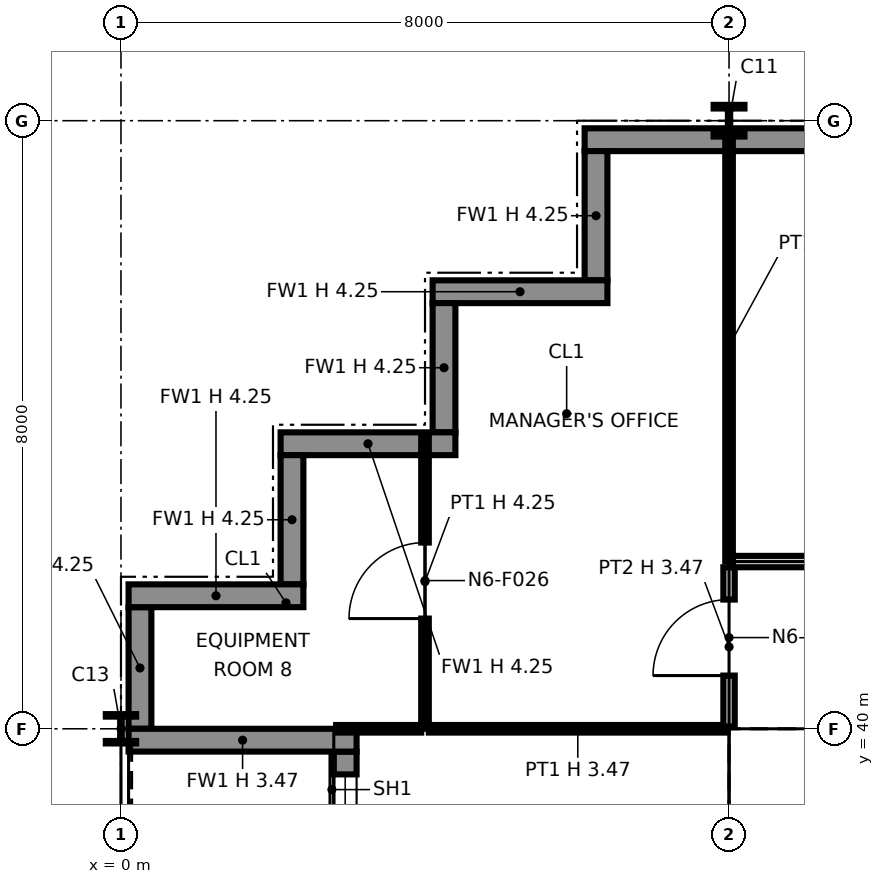
"""IFC4 building model, lengths in metres.
Left out: names, types, materials, properties, quantities, classifications, styles, units other than length and angle.
Written with IfcOpenShell. Run it as: python <this file> out.ifc"""

import sys

from ifc_helpers import new_model, si_unit, direction, frame, frame_2d, origin, origin_2d, place, context, subcontext, project, spatial, polyline, rectangle, i_section, outline, extrude, element, fill, save


model = new_model("IFC4")
c1 = context("Model", 3, precision=1e-05, world=origin(), true_north=direction((0.0, 1.0)))
c2 = subcontext(c1, "Body", "Model", "MODEL_VIEW")
j1 = project(units=[si_unit("LENGTHUNIT", "METRE"), si_unit("PLANEANGLEUNIT", "RADIAN")], contexts=[c1])
p1 = place(None, origin())
s1 = spatial("IfcSite", under=j1, at=p1, CompositionType="ELEMENT")
p2 = place(p1, origin())
s2 = spatial("IfcBuilding", under=s1, at=p2, CompositionType="ELEMENT")
p3 = place(p2, frame((0.0, 0.0, 96.4)))
s3 = spatial("IfcBuildingStorey", under=s2, at=p3, CompositionType="ELEMENT", Elevation=96.4)
p4 = place(p3, frame((0.0, 40.0, 0.0), z_axis=(0.0, 0.0, 1.0), x_axis=(1.0, 0.0, 0.0)))
e1 = element("IfcColumn", 1, at=p4, inside=s3, PredefinedType="COLUMN", context=c2, shape_type="SweptSolid", body=[
    extrude(i_section(OverallWidth=0.399, OverallDepth=0.386, WebThickness=0.021, FlangeThickness=0.033, at=origin_2d()), origin(), (0.0, 0.0, 1.0), 4.25),
])
p5 = place(p3, frame((8.0, 40.0, 0.0), z_axis=(0.0, 0.0, 1.0), x_axis=(1.0, 0.0, 0.0)))
e2 = element("IfcColumn", 2, at=p5, inside=s3, PredefinedType="COLUMN", context=c2, shape_type="SweptSolid", body=[
    extrude(i_section(OverallWidth=0.373, OverallDepth=0.368, WebThickness=0.015, FlangeThickness=0.024, at=origin_2d()), origin(), (0.0, 0.0, 1.0), 4.25),
])
p6 = place(p3, frame((8.0, 48.0, 0.0), z_axis=(0.0, 0.0, 1.0), x_axis=(1.0, 0.0, 0.0)))
e3 = element("IfcColumn", 3, at=p6, inside=s3, PredefinedType="COLUMN", context=c2, shape_type="SweptSolid", body=[
    extrude(i_section(OverallWidth=0.406, OverallDepth=0.417, WebThickness=0.03, FlangeThickness=0.048, at=origin_2d()), origin(), (0.0, 0.0, 1.0), 4.25),
])
p7 = place(p3, frame((0.25, 41.6, 0.0), z_axis=(0.0, 0.0, 1.0), x_axis=(0.0, -1.0, 0.0)))
e4 = element("IfcWall", 4, at=p7, inside=s3, PredefinedType="SOLIDWALL", context=c2, shape_type="SweptSolid", body=[
    extrude(rectangle(XDim=1.6, YDim=0.3, at=frame_2d((0.8, 0.0))), origin(), (0.0, 0.0, 1.0), 4.25),
])
p8 = place(p3, frame((2.95, 39.7, 0.0), z_axis=(0.0, 0.0, 1.0), x_axis=(0.0, -1.0, 0.0)))
e5 = element("IfcWall", 5, at=p8, inside=s3, PredefinedType="SOLIDWALL", context=c2, shape_type="SweptSolid", body=[
    extrude(rectangle(XDim=7.4, YDim=0.3, at=frame_2d((3.7, 0.0))), origin(), (0.0, 0.0, 1.0), 4.25),
])
p9 = place(p8, frame((0.3, 0.0, 0.9)))
e6 = element("IfcOpeningElement", 6, at=p9, cuts=e5, PredefinedType="OPENING", context=c2, shape_type="SweptSolid", body=[
    extrude(rectangle(XDim=2.8, YDim=2.2, at=frame_2d((1.4, 1.1))), frame((0.0, 0.16, 0.0), z_axis=(0.0, -1.0, 0.0), x_axis=(1.0, 0.0, 0.0)), (0.0, 0.0, 1.0), 0.32),
])
p10 = place(p8, frame((4.7, 0.0, 0.0)))
e7 = element("IfcOpeningElement", 7, at=p10, cuts=e5, PredefinedType="OPENING", context=c2, shape_type="SweptSolid", body=[
    extrude(rectangle(XDim=2.0, YDim=2.4, at=frame_2d((1.0, 1.2))), frame((0.0, 0.16, 0.0), z_axis=(0.0, -1.0, 0.0), x_axis=(1.0, 0.0, 0.0)), (0.0, 0.0, 1.0), 0.32),
])
p11 = place(p3, frame((0.1, 39.85, 0.0), z_axis=(0.0, 0.0, 1.0), x_axis=(1.0, 0.0, 0.0)))
e8 = element("IfcWall", 8, at=p11, inside=s3, PredefinedType="SOLIDWALL", context=c2, shape_type="SweptSolid", body=[
    extrude(rectangle(XDim=3.0, YDim=0.3, at=frame_2d((1.5, 0.0))), origin(), (0.0, 0.0, 1.0), 3.469),
])
p12 = place(p3, frame((16.0, 47.75, 0.0), z_axis=(0.0, 0.0, 1.0), x_axis=(-1.0, 0.0, 0.0)))
e9 = element("IfcWall", 9, at=p12, inside=s3, PredefinedType="SOLIDWALL", context=c2, shape_type="SweptSolid", body=[
    extrude(rectangle(XDim=9.9, YDim=0.3, at=frame_2d((4.95, 0.0))), origin(), (0.0, 0.0, 1.0), 4.25),
])
p13 = place(p3, frame((6.25, 47.6, 0.0), z_axis=(0.0, 0.0, 1.0), x_axis=(0.0, -1.0, 0.0)))
e10 = element("IfcWall", 10, at=p13, inside=s3, PredefinedType="SOLIDWALL", context=c2, shape_type="SweptSolid", body=[
    extrude(rectangle(XDim=1.7, YDim=0.3, at=frame_2d((0.85, 0.0))), origin(), (0.0, 0.0, 1.0), 4.25),
])
p14 = place(p3, frame((6.4, 45.75, 0.0), z_axis=(0.0, 0.0, 1.0), x_axis=(-1.0, 0.0, 0.0)))
e11 = element("IfcWall", 11, at=p14, inside=s3, PredefinedType="SOLIDWALL", context=c2, shape_type="SweptSolid", body=[
    extrude(rectangle(XDim=2.3, YDim=0.3, at=frame_2d((1.15, 0.0))), origin(), (0.0, 0.0, 1.0), 4.25),
])
p15 = place(p3, frame((4.25, 45.6, 0.0), z_axis=(0.0, 0.0, 1.0), x_axis=(0.0, -1.0, 0.0)))
e12 = element("IfcWall", 12, at=p15, inside=s3, PredefinedType="SOLIDWALL", context=c2, shape_type="SweptSolid", body=[
    extrude(rectangle(XDim=1.7, YDim=0.3, at=frame_2d((0.85, 0.0))), origin(), (0.0, 0.0, 1.0), 4.25),
])
p16 = place(p3, frame((4.4, 43.75, 0.0), z_axis=(0.0, 0.0, 1.0), x_axis=(-1.0, 0.0, 0.0)))
e13 = element("IfcWall", 13, at=p16, inside=s3, PredefinedType="SOLIDWALL", context=c2, shape_type="SweptSolid", body=[
    extrude(rectangle(XDim=2.3, YDim=0.3, at=frame_2d((1.15, 0.0))), origin(), (0.0, 0.0, 1.0), 4.25),
])
p17 = place(p3, frame((2.25, 43.6, 0.0), z_axis=(0.0, 0.0, 1.0), x_axis=(0.0, -1.0, 0.0)))
e14 = element("IfcWall", 14, at=p17, inside=s3, PredefinedType="SOLIDWALL", context=c2, shape_type="SweptSolid", body=[
    extrude(rectangle(XDim=1.7, YDim=0.3, at=frame_2d((0.85, 0.0))), origin(), (0.0, 0.0, 1.0), 4.25),
])
p18 = place(p3, frame((2.4, 41.75, 0.0), z_axis=(0.0, 0.0, 1.0), x_axis=(-1.0, 0.0, 0.0)))
e15 = element("IfcWall", 15, at=p18, inside=s3, PredefinedType="SOLIDWALL", context=c2, shape_type="SweptSolid", body=[
    extrude(rectangle(XDim=2.3, YDim=0.3, at=frame_2d((1.15, 0.0))), origin(), (0.0, 0.0, 1.0), 4.25),
])
p19 = place(p3, frame((8.75, 32.85, 0.0), z_axis=(0.0, 0.0, 1.0), x_axis=(0.0, 1.0, 0.0)))
e16 = element("IfcWall", 16, at=p19, inside=s3, PredefinedType="PARTITIONING", context=c2, shape_type="SweptSolid", body=[
    extrude(outline(polyline([(0.0, 0.0), (6.3, 0.0), (6.3, 4.25), (3.231, 4.25), (3.23, 3.789), (3.07, 3.789), (3.069, 4.25), (0.0, 4.25), (0.0, 0.0)])), frame((0.0, 0.1, 0.0), z_axis=(0.0, -1.0, 0.0), x_axis=(1.0, 0.0, 0.0)), (0.0, 0.0, 1.0), 0.2),
])
p20 = place(p3, frame((8.65, 39.25, 0.0), z_axis=(0.0, 0.0, 1.0), x_axis=(1.0, 0.0, 0.0)))
e17 = element("IfcWall", 17, at=p20, inside=s3, PredefinedType="PARTITIONING", context=c2, shape_type="SweptSolid", body=[
    extrude(outline(polyline([(0.0, 0.0), (14.7, 0.0), (14.7, 4.25), (7.469, 4.25), (7.469, 3.632), (7.231, 3.632), (7.23, 4.25), (0.0, 4.25), (0.0, 0.0)])), frame((0.0, 0.1, 0.0), z_axis=(0.0, -1.0, 0.0), x_axis=(1.0, 0.0, 0.0)), (0.0, 0.0, 1.0), 0.2),
])
p21 = place(p3, frame((2.83, 40.0, 0.0), z_axis=(0.0, 0.0, 1.0), x_axis=(1.0, 0.0, 0.0)))
e18 = element("IfcWall", 18, at=p21, inside=s3, PredefinedType="PARTITIONING", context=c2, shape_type="SweptSolid", body=[
    extrude(rectangle(XDim=1.12, YDim=0.1, at=frame_2d((0.56, 0.0))), origin(), (0.0, 0.0, 1.0), 3.47),
])
p22 = place(p3, frame((4.05, 40.0, 0.0), z_axis=(0.0, 0.0, 1.0), x_axis=(1.0, 0.0, 0.0)))
e19 = element("IfcWall", 19, at=p22, inside=s3, PredefinedType="PARTITIONING", context=c2, shape_type="SweptSolid", body=[
    extrude(rectangle(XDim=3.92, YDim=0.1, at=frame_2d((1.96, 0.0))), origin(), (0.0, 0.0, 1.0), 3.47),
])
p23 = place(p3, frame((4.0, 40.0, 0.0), z_axis=(0.0, 0.0, 1.0), x_axis=(0.0, 1.0, 0.0)))
e20 = element("IfcWall", 20, at=p23, inside=s3, PredefinedType="PARTITIONING", context=c2, shape_type="SweptSolid", body=[
    extrude(rectangle(XDim=3.87, YDim=0.1, at=frame_2d((1.935, 0.0))), origin(), (0.0, 0.0, 1.0), 4.25),
])
p24 = place(p23, frame((1.45, 0.0, 0.0)))
e21 = element("IfcOpeningElement", 21, at=p24, cuts=e20, PredefinedType="OPENING", context=c2, shape_type="SweptSolid", body=[
    extrude(rectangle(XDim=1.0, YDim=2.1, at=frame_2d((0.5, 1.05))), frame((0.0, 0.06, 0.0), z_axis=(0.0, -1.0, 0.0), x_axis=(1.0, 0.0, 0.0)), (0.0, 0.0, 1.0), 0.12),
])
p25 = place(p3, frame((8.0, 40.03, 0.0), z_axis=(0.0, 0.0, 1.0), x_axis=(0.0, 1.0, 0.0)))
e22 = element("IfcWall", 22, at=p25, inside=s3, PredefinedType="PARTITIONING", context=c2, shape_type="SweptSolid", body=[
    extrude(rectangle(XDim=2.095, YDim=0.15, at=frame_2d((1.047, 0.0))), origin(), (0.0, 0.0, 1.0), 3.47),
])
p26 = place(p25, frame((0.67, 0.0, 0.0)))
e23 = element("IfcOpeningElement", 23, at=p26, cuts=e22, PredefinedType="OPENING", context=c2, shape_type="SweptSolid", body=[
    extrude(rectangle(XDim=1.0, YDim=2.1, at=frame_2d((0.5, 1.05))), frame((0.0, 0.085, 0.0), z_axis=(0.0, -1.0, 0.0), x_axis=(1.0, 0.0, 0.0)), (0.0, 0.0, 1.0), 0.17),
])
p27 = place(p3, frame((8.05, 42.2, 0.0), z_axis=(0.0, 0.0, 1.0), x_axis=(1.0, 0.0, 0.0)))
e24 = element("IfcWall", 24, at=p27, inside=s3, PredefinedType="PARTITIONING", context=c2, shape_type="SweptSolid", body=[
    extrude(rectangle(XDim=34.15, YDim=0.15, at=frame_2d((17.075, 0.0))), origin(), (0.0, 0.0, 1.0), 4.25),
])
p28 = place(p27, frame((11.45, 0.0, 0.0)))
e25 = element("IfcOpeningElement", 25, at=p28, cuts=e24, PredefinedType="OPENING", context=c2, shape_type="SweptSolid", body=[
    extrude(rectangle(XDim=1.0, YDim=2.1, at=frame_2d((0.5, 1.05))), frame((0.0, 0.085, 0.0), z_axis=(0.0, -1.0, 0.0), x_axis=(1.0, 0.0, 0.0)), (0.0, 0.0, 1.0), 0.17),
])
p29 = place(p27, frame((27.45, 0.0, 0.0)))
e26 = element("IfcOpeningElement", 26, at=p29, cuts=e24, PredefinedType="OPENING", context=c2, shape_type="SweptSolid", body=[
    extrude(rectangle(XDim=1.0, YDim=2.1, at=frame_2d((0.5, 1.05))), frame((0.0, 0.085, 0.0), z_axis=(0.0, -1.0, 0.0), x_axis=(1.0, 0.0, 0.0)), (0.0, 0.0, 1.0), 0.17),
])
p30 = place(p27, frame((1.45, 0.0, 0.0)))
e27 = element("IfcOpeningElement", 27, at=p30, cuts=e24, PredefinedType="OPENING", context=c2, shape_type="SweptSolid", body=[
    extrude(rectangle(XDim=1.0, YDim=2.1, at=frame_2d((0.5, 1.05))), frame((0.0, 0.085, 0.0), z_axis=(0.0, -1.0, 0.0), x_axis=(1.0, 0.0, 0.0)), (0.0, 0.0, 1.0), 0.17),
])
p31 = place(p27, frame((5.45, 0.0, 0.0)))
e28 = element("IfcOpeningElement", 28, at=p31, cuts=e24, PredefinedType="OPENING", context=c2, shape_type="SweptSolid", body=[
    extrude(rectangle(XDim=1.0, YDim=2.1, at=frame_2d((0.5, 1.05))), frame((0.0, 0.085, 0.0), z_axis=(0.0, -1.0, 0.0), x_axis=(1.0, 0.0, 0.0)), (0.0, 0.0, 1.0), 0.17),
])
p32 = place(p27, frame((17.45, 0.0, 0.0)))
e29 = element("IfcOpeningElement", 29, at=p32, cuts=e24, PredefinedType="OPENING", context=c2, shape_type="SweptSolid", body=[
    extrude(rectangle(XDim=1.0, YDim=2.1, at=frame_2d((0.5, 1.05))), frame((0.0, 0.085, 0.0), z_axis=(0.0, -1.0, 0.0), x_axis=(1.0, 0.0, 0.0)), (0.0, 0.0, 1.0), 0.17),
])
p33 = place(p27, frame((21.45, 0.0, 0.0)))
e30 = element("IfcOpeningElement", 30, at=p33, cuts=e24, PredefinedType="OPENING", context=c2, shape_type="SweptSolid", body=[
    extrude(rectangle(XDim=1.0, YDim=2.1, at=frame_2d((0.5, 1.05))), frame((0.0, 0.085, 0.0), z_axis=(0.0, -1.0, 0.0), x_axis=(1.0, 0.0, 0.0)), (0.0, 0.0, 1.0), 0.17),
])
p34 = place(p3, frame((8.0, 42.2, 0.0), z_axis=(0.0, 0.0, 1.0), x_axis=(0.0, 1.0, 0.0)))
e31 = element("IfcWall", 31, at=p34, inside=s3, PredefinedType="PARTITIONING", context=c2, shape_type="SweptSolid", body=[
    extrude(rectangle(XDim=5.67, YDim=0.1, at=frame_2d((2.835, 0.0))), origin(), (0.0, 0.0, 1.0), 3.47),
])
p35 = place(p9, origin())
e32 = element("IfcWindow", 32, at=p35, inside=s3, PartitioningType="SINGLE_PANEL", PredefinedType="WINDOW", context=c2, shape_type="SweptSolid", body=[
    extrude(rectangle(XDim=2.8, YDim=2.2, at=frame_2d((1.4, 1.1))), frame((0.0, 0.03, 0.0), z_axis=(0.0, -1.0, 0.0), x_axis=(1.0, 0.0, 0.0)), (0.0, 0.0, 1.0), 0.06),
])
fill(e6, e32)
p36 = place(p26, origin())
e33 = element("IfcDoor", 33, at=p36, inside=s3, OperationType="SINGLE_SWING_LEFT", PredefinedType="DOOR", context=c2, shape_type="SweptSolid", body=[
    extrude(rectangle(XDim=1.0, YDim=2.1, at=frame_2d((0.5, 1.05))), frame((0.0, 0.025, 0.0), z_axis=(0.0, -1.0, 0.0), x_axis=(1.0, 0.0, 0.0)), (0.0, 0.0, 1.0), 0.05),
])
fill(e23, e33)
p37 = place(p24, origin())
e34 = element("IfcDoor", 34, at=p37, inside=s3, OperationType="SINGLE_SWING_LEFT", PredefinedType="DOOR", context=c2, shape_type="SweptSolid", body=[
    extrude(rectangle(XDim=1.0, YDim=2.1, at=frame_2d((0.5, 1.05))), frame((0.0, 0.025, 0.0), z_axis=(0.0, -1.0, 0.0), x_axis=(1.0, 0.0, 0.0)), (0.0, 0.0, 1.0), 0.05),
])
fill(e21, e34)
save(model, sys.argv[1])
